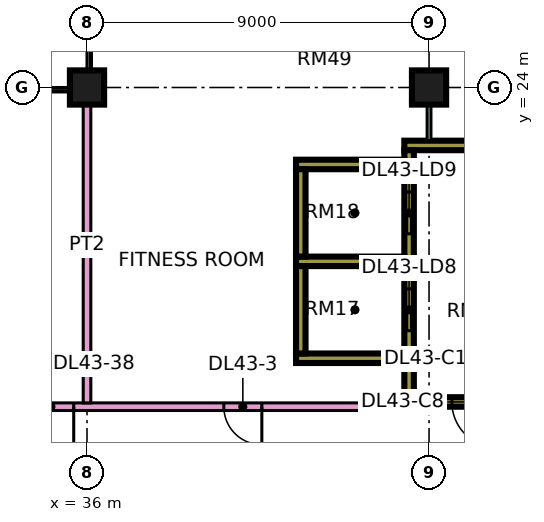
"""IFC4 building model, lengths in metres.
Left out: names, types, materials, properties, quantities, classifications, styles, units other than length and angle.
Written with IfcOpenShell. Run it as: python <this file> out.ifc"""

import sys

from ifc_helpers import new_model, si_unit, direction, frame, frame_2d, origin, origin_2d, place, context, subcontext, project, spatial, rectangle, extrude, element, fill, save


model = new_model("IFC4")
c1 = context("Model", 3, precision=1e-05, world=origin(), true_north=direction((0.0, 1.0)))
c2 = subcontext(c1, "Body", "Model", "MODEL_VIEW")
j1 = project(units=[si_unit("LENGTHUNIT", "METRE"), si_unit("PLANEANGLEUNIT", "RADIAN")], contexts=[c1])
p1 = place(None, origin())
s1 = spatial("IfcSite", under=j1, at=p1, CompositionType="ELEMENT")
p2 = place(p1, origin())
s2 = spatial("IfcBuilding", under=s1, at=p2, CompositionType="ELEMENT")
p3 = place(p2, frame((0.0, 0.0, 187.4)))
s3 = spatial("IfcBuildingStorey", under=s2, at=p3, CompositionType="ELEMENT", Elevation=187.4)
for number, where, z_axis, x_axis in (
    (1, (36.0, 24.0, 0.0), (0.0, 0.0, 1.0), (1.0, 0.0, 0.0)),
    (2, (45.0, 24.0, 0.0), (0.0, 0.0, 1.0), (1.0, 0.0, 0.0)),
):
    element("IfcColumn", number, at=place(p3, frame(where, z_axis=z_axis, x_axis=x_axis)), inside=s3, PredefinedType="COLUMN", context=c2, shape_type="SweptSolid", body=[
        extrude(rectangle(XDim=0.9, YDim=0.9, at=origin_2d()), origin(), (0.0, 0.0, 1.0), 3.75),
    ])
p4 = place(p3, frame((44.35, 15.725, 0.0), z_axis=(0.0, 0.0, 1.0), x_axis=(1.0, 0.0, 0.0)))
e3 = element("IfcWall", 3, at=p4, inside=s3, PredefinedType="SHEAR", context=c2, shape_type="SweptSolid", body=[
    extrude(rectangle(XDim=3.425, YDim=0.25, at=frame_2d((1.712, 0.0))), origin(), (0.0, 0.0, 1.0), 3.75),
])
p5 = place(p4, frame((1.25, 0.0, 0.0)))
e4 = element("IfcOpeningElement", 4, at=p5, cuts=e3, PredefinedType="OPENING", context=c2, shape_type="SweptSolid", body=[
    extrude(rectangle(XDim=1.2, YDim=2.2, at=frame_2d((0.6, 1.1))), frame((0.0, 0.135, 0.0), z_axis=(0.0, -1.0, 0.0), x_axis=(1.0, 0.0, 0.0)), (0.0, 0.0, 1.0), 0.27),
])
p6 = place(p3, frame((44.35, 22.475, 0.0), z_axis=(0.0, 0.0, 1.0), x_axis=(1.0, 0.0, 0.0)))
e5 = element("IfcWall", 5, at=p6, inside=s3, PredefinedType="SHEAR", context=c2, shape_type="SweptSolid", body=[
    extrude(rectangle(XDim=3.425, YDim=0.25, at=frame_2d((1.712, 0.0))), origin(), (0.0, 0.0, 1.0), 3.75),
])
p7 = place(p3, frame((44.475, 15.85, 0.0), z_axis=(0.0, 0.0, 1.0), x_axis=(0.0, 1.0, 0.0)))
e6 = element("IfcWall", 6, at=p7, inside=s3, PredefinedType="SHEAR", context=c2, shape_type="SweptSolid", body=[
    extrude(rectangle(XDim=6.5, YDim=0.25, at=frame_2d((3.25, 0.0))), origin(), (0.0, 0.0, 1.0), 3.75),
])
p8 = place(p7, frame((1.75, 0.0, 0.0)))
e7 = element("IfcOpeningElement", 7, at=p8, cuts=e6, PredefinedType="OPENING", context=c2, shape_type="SweptSolid", body=[
    extrude(rectangle(XDim=1.1, YDim=2.2, at=frame_2d((0.55, 1.1))), frame((0.0, 0.135, 0.0), z_axis=(0.0, -1.0, 0.0), x_axis=(1.0, 0.0, 0.0)), (0.0, 0.0, 1.0), 0.27),
])
p9 = place(p7, frame((4.3, 0.0, 0.0)))
e8 = element("IfcOpeningElement", 8, at=p9, cuts=e6, PredefinedType="OPENING", context=c2, shape_type="SweptSolid", body=[
    extrude(rectangle(XDim=1.1, YDim=2.2, at=frame_2d((0.55, 1.1))), frame((0.0, 0.135, 0.0), z_axis=(0.0, -1.0, 0.0), x_axis=(1.0, 0.0, 0.0)), (0.0, 0.0, 1.0), 0.27),
])
for number, where, z_axis, x_axis in (
    (9, (41.5, 16.875, 0.0), (0.0, 0.0, 1.0), (1.0, 0.0, 0.0)),
    (10, (41.5, 19.425, 0.0), (0.0, 0.0, 1.0), (1.0, 0.0, 0.0)),
    (11, (41.5, 21.975, 0.0), (0.0, 0.0, 1.0), (1.0, 0.0, 0.0)),
):
    element("IfcWall", number, at=place(p3, frame(where, z_axis=z_axis, x_axis=x_axis)), inside=s3, PredefinedType="SHEAR", context=c2, shape_type="SweptSolid", body=[
        extrude(rectangle(XDim=2.85, YDim=0.25, at=frame_2d((1.425, 0.0))), origin(), (0.0, 0.0, 1.0), 3.75),
    ])
for number, where, z_axis, x_axis in (
    (12, (41.625, 17.0, 0.0), (0.0, 0.0, 1.0), (0.0, 1.0, 0.0)),
    (13, (41.625, 19.55, 0.0), (0.0, 0.0, 1.0), (0.0, 1.0, 0.0)),
):
    element("IfcWall", number, at=place(p3, frame(where, z_axis=z_axis, x_axis=x_axis)), inside=s3, PredefinedType="SHEAR", context=c2, shape_type="SweptSolid", body=[
        extrude(rectangle(XDim=2.3, YDim=0.25, at=frame_2d((1.15, 0.0))), origin(), (0.0, 0.0, 1.0), 3.75),
    ])
p10 = place(p3, frame((34.0, 15.6, 0.0), z_axis=(0.0, 0.0, 1.0), x_axis=(1.0, 0.0, 0.0)))
e14 = element("IfcWall", 14, at=p10, inside=s3, PredefinedType="PARTITIONING", context=c2, shape_type="SweptSolid", body=[
    extrude(rectangle(XDim=10.35, YDim=0.2, at=frame_2d((5.175, 0.0))), origin(), (0.0, 0.0, 1.0), 3.35),
])
p11 = place(p10, frame((5.6, 0.0, 0.0)))
e15 = element("IfcOpeningElement", 15, at=p11, cuts=e14, PredefinedType="OPENING", context=c2, shape_type="SweptSolid", body=[
    extrude(rectangle(XDim=1.0, YDim=2.1, at=frame_2d((0.5, 1.05))), frame((0.0, 0.11, 0.0), z_axis=(0.0, -1.0, 0.0), x_axis=(1.0, 0.0, 0.0)), (0.0, 0.0, 1.0), 0.22),
])
p12 = place(p10, frame((0.45, 0.0, 0.0)))
e16 = element("IfcOpeningElement", 16, at=p12, cuts=e14, PredefinedType="OPENING", context=c2, shape_type="SweptSolid", body=[
    extrude(rectangle(XDim=1.2, YDim=2.1, at=frame_2d((0.6, 1.05))), frame((0.0, 0.11, 0.0), z_axis=(0.0, -1.0, 0.0), x_axis=(1.0, 0.0, 0.0)), (0.0, 0.0, 1.0), 0.22),
])
p13 = place(p3, frame((36.0, 15.7, 0.0), z_axis=(0.0, 0.0, 1.0), x_axis=(0.0, 1.0, 0.0)))
e17 = element("IfcWall", 17, at=p13, inside=s3, PredefinedType="PARTITIONING", context=c2, shape_type="SweptSolid", body=[
    extrude(rectangle(XDim=8.3, YDim=0.2, at=frame_2d((4.15, 0.0))), origin(), (0.0, 0.0, 1.0), 3.35),
])
p14 = place(p3, frame((45.0, 22.6, 0.0), z_axis=(0.0, 0.0, 1.0), x_axis=(0.0, 1.0, 0.0)))
e18 = element("IfcWall", 18, at=p14, inside=s3, PredefinedType="PARTITIONING", context=c2, shape_type="SweptSolid", body=[
    extrude(rectangle(XDim=1.4, YDim=0.1, at=frame_2d((0.7, 0.0))), origin(), (0.0, 0.0, 1.0), 3.35),
])
p15 = place(p5, origin())
e19 = element("IfcDoor", 19, at=p15, inside=s3, OperationType="SINGLE_SWING_RIGHT", PredefinedType="DOOR", context=c2, shape_type="SweptSolid", body=[
    extrude(rectangle(XDim=1.2, YDim=2.2, at=frame_2d((0.6, 1.1))), frame((0.0, 0.025, 0.0), z_axis=(0.0, -1.0, 0.0), x_axis=(1.0, 0.0, 0.0)), (0.0, 0.0, 1.0), 0.05),
])
fill(e4, e19)
p16 = place(p8, origin())
e20 = element("IfcDoor", 20, at=p16, inside=s3, OperationType="DOUBLE_DOOR_SLIDING", PredefinedType="DOOR", context=c2, shape_type="SweptSolid", body=[
    extrude(rectangle(XDim=1.1, YDim=2.2, at=frame_2d((0.55, 1.1))), frame((0.0, 0.025, 0.0), z_axis=(0.0, -1.0, 0.0), x_axis=(1.0, 0.0, 0.0)), (0.0, 0.0, 1.0), 0.05),
])
fill(e7, e20)
p17 = place(p9, origin())
e21 = element("IfcDoor", 21, at=p17, inside=s3, OperationType="DOUBLE_DOOR_SLIDING", PredefinedType="DOOR", context=c2, shape_type="SweptSolid", body=[
    extrude(rectangle(XDim=1.1, YDim=2.2, at=frame_2d((0.55, 1.1))), frame((0.0, 0.025, 0.0), z_axis=(0.0, -1.0, 0.0), x_axis=(1.0, 0.0, 0.0)), (0.0, 0.0, 1.0), 0.05),
])
fill(e8, e21)
p18 = place(p11, origin())
e22 = element("IfcDoor", 22, at=p18, inside=s3, OperationType="SINGLE_SWING_RIGHT", PredefinedType="DOOR", context=c2, shape_type="SweptSolid", body=[
    extrude(rectangle(XDim=1.0, YDim=2.1, at=frame_2d((0.5, 1.05))), frame((0.0, 0.025, 0.0), z_axis=(0.0, -1.0, 0.0), x_axis=(1.0, 0.0, 0.0)), (0.0, 0.0, 1.0), 0.05),
])
fill(e15, e22)
p19 = place(p12, origin())
e23 = element("IfcDoor", 23, at=p19, inside=s3, OperationType="SINGLE_SWING_RIGHT", PredefinedType="DOOR", context=c2, shape_type="SweptSolid", body=[
    extrude(rectangle(XDim=1.2, YDim=2.1, at=frame_2d((0.6, 1.05))), frame((0.0, 0.025, 0.0), z_axis=(0.0, -1.0, 0.0), x_axis=(1.0, 0.0, 0.0)), (0.0, 0.0, 1.0), 0.05),
])
fill(e16, e23)
save(model, sys.argv[1])
